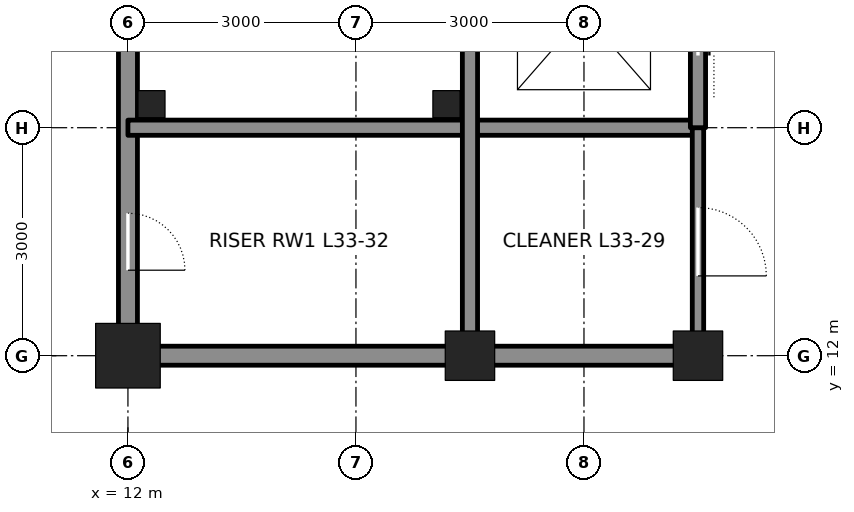
"""IFC4 building model, lengths in metres.
Left out: names, types, materials, properties, quantities, classifications, styles, units other than length and angle.
Written with IfcOpenShell. Run it as: python <this file> out.ifc"""

import sys

from ifc_helpers import new_model, si_unit, direction, frame, frame_2d, origin, origin_2d, place, context, subcontext, project, spatial, rectangle, hollow_rectangle, extrude, element, fill, save


model = new_model("IFC4")
c1 = context("Model", 3, precision=1e-05, world=origin(), true_north=direction((0.0, 1.0)))
c2 = subcontext(c1, "Body", "Model", "MODEL_VIEW")
j1 = project(units=[si_unit("LENGTHUNIT", "METRE"), si_unit("PLANEANGLEUNIT", "RADIAN")], contexts=[c1])
p1 = place(None, origin())
s1 = spatial("IfcSite", under=j1, at=p1, CompositionType="ELEMENT")
p2 = place(p1, origin())
s2 = spatial("IfcBuilding", under=s1, at=p2, CompositionType="ELEMENT")
p3 = place(p2, frame((0.0, 0.0, 153.0)))
s3 = spatial("IfcBuildingStorey", under=s2, at=p3, CompositionType="ELEMENT", Elevation=153.0)
p4 = place(p3, frame((12.0, 12.0, 0.0), z_axis=(0.0, 0.0, 1.0), x_axis=(1.0, 0.0, 0.0)))
e1 = element("IfcColumn", 1, at=p4, inside=s3, PredefinedType="COLUMN", context=c2, shape_type="SweptSolid", body=[
    extrude(hollow_rectangle(XDim=0.85, YDim=0.85, WallThickness=0.085, at=origin_2d()), origin(), (0.0, 0.0, 1.0), 4.2),
])
for number, where, z_axis, x_axis in (
    (2, (16.5, 12.0, 0.0), (0.0, 0.0, 1.0), (1.0, 0.0, 0.0)),
    (3, (19.5, 12.0, 0.0), (0.0, 0.0, 1.0), (1.0, 0.0, 0.0)),
):
    element("IfcColumn", number, at=place(p3, frame(where, z_axis=z_axis, x_axis=x_axis)), inside=s3, PredefinedType="COLUMN", context=c2, shape_type="SweptSolid", body=[
        extrude(hollow_rectangle(XDim=0.65, YDim=0.65, WallThickness=0.065, at=origin_2d()), origin(), (0.0, 0.0, 1.0), 4.2),
    ])
p5 = place(p3, frame((12.0, 12.25, 0.0), z_axis=(0.0, 0.0, 1.0), x_axis=(0.0, 1.0, 0.0)))
e4 = element("IfcWall", 4, at=p5, inside=s3, PredefinedType="SOLIDWALL", context=c2, shape_type="SweptSolid", body=[
    extrude(rectangle(XDim=8.5, YDim=0.25, at=frame_2d((4.25, 0.0))), origin(), (0.0, 0.0, 1.0), 3.113),
])
p6 = place(p5, frame((0.875, 0.0, 0.0)))
e5 = element("IfcOpeningElement", 5, at=p6, cuts=e4, PredefinedType="OPENING", context=c2, shape_type="SweptSolid", body=[
    extrude(rectangle(XDim=0.75, YDim=2.1, at=frame_2d((0.375, 1.05))), frame((0.0, 0.135, 0.0), z_axis=(0.0, -1.0, 0.0), x_axis=(1.0, 0.0, 0.0)), (0.0, 0.0, 1.0), 0.27),
])
p7 = place(p3, frame((12.25, 12.0, 0.0), z_axis=(0.0, 0.0, 1.0), x_axis=(1.0, 0.0, 0.0)))
e6 = element("IfcWall", 6, at=p7, inside=s3, PredefinedType="SOLIDWALL", context=c2, shape_type="SweptSolid", body=[
    extrude(rectangle(XDim=4.0, YDim=0.25, at=frame_2d((2.0, 0.0))), origin(), (0.0, 0.0, 1.0), 3.181),
])
p8 = place(p3, frame((16.75, 12.0, 0.0), z_axis=(0.0, 0.0, 1.0), x_axis=(1.0, 0.0, 0.0)))
e7 = element("IfcWall", 7, at=p8, inside=s3, PredefinedType="SOLIDWALL", context=c2, shape_type="SweptSolid", body=[
    extrude(rectangle(XDim=2.5, YDim=0.25, at=frame_2d((1.25, 0.0))), origin(), (0.0, 0.0, 1.0), 3.181),
])
p9 = place(p3, frame((12.0, 15.0, 0.0), z_axis=(0.0, 0.0, 1.0), x_axis=(1.0, 0.0, 0.0)))
e8 = element("IfcWall", 8, at=p9, inside=s3, PredefinedType="SOLIDWALL", context=c2, shape_type="SweptSolid", body=[
    extrude(rectangle(XDim=7.5, YDim=0.2, at=frame_2d((3.75, 0.0))), origin(), (0.0, 0.0, 1.0), 4.04),
])
p10 = place(p3, frame((16.5, 12.25, 0.0), z_axis=(0.0, 0.0, 1.0), x_axis=(0.0, 1.0, 0.0)))
e9 = element("IfcWall", 9, at=p10, inside=s3, PredefinedType="SOLIDWALL", context=c2, shape_type="SweptSolid", body=[
    extrude(rectangle(XDim=8.5, YDim=0.2, at=frame_2d((4.25, 0.0))), origin(), (0.0, 0.0, 1.0), 3.113),
])
p11 = place(p3, frame((19.5, 12.25, 0.0), z_axis=(0.0, 0.0, 1.0), x_axis=(0.0, 1.0, 0.0)))
e10 = element("IfcWall", 10, at=p11, inside=s3, PredefinedType="PARTITIONING", context=c2, shape_type="SweptSolid", body=[
    extrude(rectangle(XDim=2.75, YDim=0.15, at=frame_2d((1.375, 0.0))), origin(), (0.0, 0.0, 1.0), 3.065),
])
p12 = place(p11, frame((0.8, 0.0, 0.0)))
e11 = element("IfcOpeningElement", 11, at=p12, cuts=e10, PredefinedType="OPENING", context=c2, shape_type="SweptSolid", body=[
    extrude(rectangle(XDim=0.9, YDim=2.1, at=frame_2d((0.45, 1.05))), frame((0.0, 0.085, 0.0), z_axis=(0.0, -1.0, 0.0), x_axis=(1.0, 0.0, 0.0)), (0.0, 0.0, 1.0), 0.17),
])
p13 = place(p3, frame((19.5, 15.0, 0.0), z_axis=(0.0, 0.0, 1.0), x_axis=(0.0, 1.0, 0.0)))
e12 = element("IfcWall", 12, at=p13, inside=s3, PredefinedType="SOLIDWALL", context=c2, shape_type="SweptSolid", body=[
    extrude(rectangle(XDim=12.0, YDim=0.2, at=frame_2d((6.0, 0.0))), origin(), (0.0, 0.0, 1.0), 3.065),
])
p14 = place(p13, frame((0.95, 0.0, 0.0)))
e13 = element("IfcOpeningElement", 13, at=p14, cuts=e12, PredefinedType="OPENING", context=c2, shape_type="SweptSolid", body=[
    extrude(rectangle(XDim=1.1, YDim=2.1, at=frame_2d((0.55, 1.05))), frame((0.0, 0.11, 0.0), z_axis=(0.0, -1.0, 0.0), x_axis=(1.0, 0.0, 0.0)), (0.0, 0.0, 1.0), 0.22),
])
p15 = place(p13, frame((3.95, 0.0, 0.0)))
e14 = element("IfcOpeningElement", 14, at=p15, cuts=e12, PredefinedType="OPENING", context=c2, shape_type="SweptSolid", body=[
    extrude(rectangle(XDim=1.1, YDim=2.1, at=frame_2d((0.55, 1.05))), frame((0.0, 0.11, 0.0), z_axis=(0.0, -1.0, 0.0), x_axis=(1.0, 0.0, 0.0)), (0.0, 0.0, 1.0), 0.22),
])
p16 = place(p13, frame((6.95, 0.0, 0.0)))
e15 = element("IfcOpeningElement", 15, at=p16, cuts=e12, PredefinedType="OPENING", context=c2, shape_type="SweptSolid", body=[
    extrude(rectangle(XDim=1.1, YDim=2.1, at=frame_2d((0.55, 1.05))), frame((0.0, 0.11, 0.0), z_axis=(0.0, -1.0, 0.0), x_axis=(1.0, 0.0, 0.0)), (0.0, 0.0, 1.0), 0.22),
])
p17 = place(p13, frame((9.95, 0.0, 0.0)))
e16 = element("IfcOpeningElement", 16, at=p17, cuts=e12, PredefinedType="OPENING", context=c2, shape_type="SweptSolid", body=[
    extrude(rectangle(XDim=1.1, YDim=2.1, at=frame_2d((0.55, 1.05))), frame((0.0, 0.11, 0.0), z_axis=(0.0, -1.0, 0.0), x_axis=(1.0, 0.0, 0.0)), (0.0, 0.0, 1.0), 0.22),
])
for number, where, z_axis, x_axis in (
    (17, (12.31, 15.31, 0.0), (0.0, 0.0, 1.0), (1.0, 0.0, 0.0)),
    (18, (16.19, 15.31, 0.0), (0.0, 0.0, 1.0), (1.0, 0.0, 0.0)),
):
    element("IfcColumn", number, at=place(p3, frame(where, z_axis=z_axis, x_axis=x_axis)), inside=s3, PredefinedType="COLUMN", context=c2, shape_type="SweptSolid", body=[
        extrude(hollow_rectangle(XDim=0.356, YDim=0.356, WallThickness=0.015, at=origin_2d()), origin(), (0.0, 0.0, 1.0), 4.2),
    ])
p18 = place(p6, frame((0.75, 0.0, 0.0), z_axis=(0.0, 0.0, 1.0), x_axis=(-1.0, 0.0, 0.0)))
e19 = element("IfcDoor", 19, at=p18, inside=s3, OperationType="SINGLE_SWING_RIGHT", PredefinedType="DOOR", context=c2, shape_type="SweptSolid", body=[
    extrude(rectangle(XDim=0.75, YDim=2.1, at=frame_2d((0.375, 1.05))), frame((0.0, 0.025, 0.0), z_axis=(0.0, -1.0, 0.0), x_axis=(1.0, 0.0, 0.0)), (0.0, 0.0, 1.0), 0.05),
])
fill(e5, e19)
p19 = place(p12, frame((0.9, 0.0, 0.0), z_axis=(0.0, 0.0, 1.0), x_axis=(-1.0, 0.0, 0.0)))
e20 = element("IfcDoor", 20, at=p19, inside=s3, OperationType="SINGLE_SWING_RIGHT", PredefinedType="DOOR", context=c2, shape_type="SweptSolid", body=[
    extrude(rectangle(XDim=0.9, YDim=2.1, at=frame_2d((0.45, 1.05))), frame((0.0, 0.025, 0.0), z_axis=(0.0, -1.0, 0.0), x_axis=(1.0, 0.0, 0.0)), (0.0, 0.0, 1.0), 0.05),
])
fill(e11, e20)
p20 = place(p14, origin())
e21 = element("IfcDoor", 21, at=p20, inside=s3, OperationType="DOUBLE_DOOR_SLIDING", PredefinedType="DOOR", context=c2, shape_type="SweptSolid", body=[
    extrude(rectangle(XDim=1.1, YDim=2.1, at=frame_2d((0.55, 1.05))), frame((0.0, 0.025, 0.0), z_axis=(0.0, -1.0, 0.0), x_axis=(1.0, 0.0, 0.0)), (0.0, 0.0, 1.0), 0.05),
])
fill(e13, e21)
save(model, sys.argv[1])
